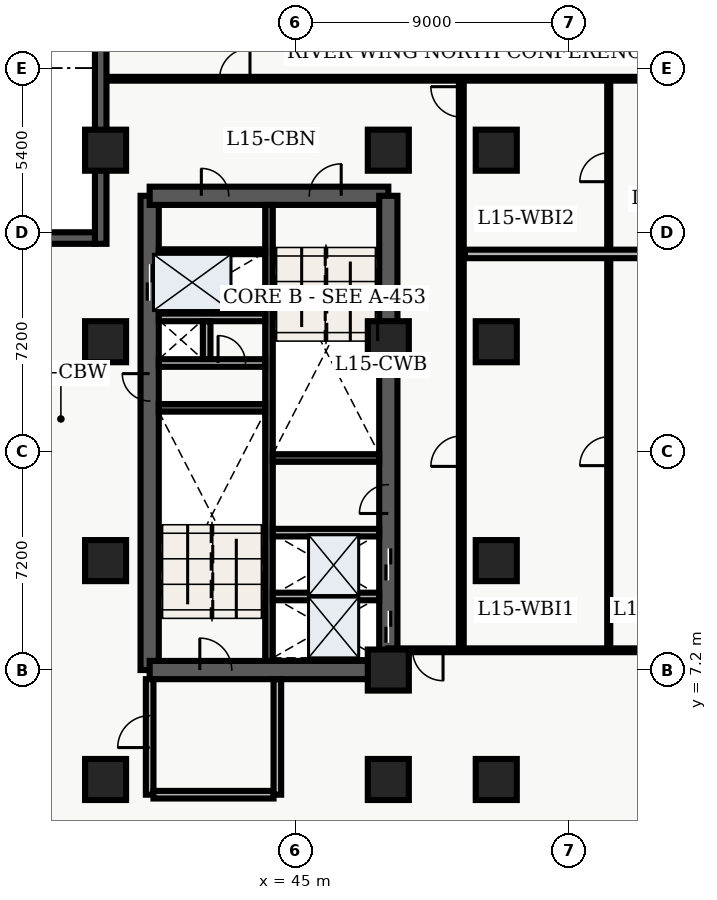
"""IFC4 building model, lengths in metres.
Left out: names, types, materials, properties, quantities, classifications, styles, units other than length and angle.
Written with IfcOpenShell. Run it as: python <this file> out.ifc"""

import sys

from ifc_helpers import new_model, entity, si_unit, converted_unit, direction, frame, origin_with_axes, origin_2d_with_axis, place, context, subcontext, project, spatial, polyline, rectangle, outline, extrude, element, fill, save


model = new_model("IFC4")
c1 = context("Model", 3, precision=1e-05, world=origin_with_axes(), true_north=direction((0.0, 1.0)))
c2 = subcontext(c1, "Body", "Model", "MODEL_VIEW")
j1 = project(units=[si_unit("LENGTHUNIT", "METRE"), converted_unit("PLANEANGLEUNIT", "DEGREE", entity("IfcPlaneAngleMeasure", 0.017), si_unit("PLANEANGLEUNIT", "RADIAN"), dimensions=[0, 0, 0, 0, 0, 0, 0])], contexts=[c1])
p1 = place(None, origin_with_axes())
s1 = spatial("IfcSite", under=j1, at=p1, CompositionType="ELEMENT")
p2 = place(p1, origin_with_axes())
s2 = spatial("IfcBuilding", under=s1, at=p2, CompositionType="ELEMENT")
p3 = place(p2, frame((0.0, 0.0, 63.9), z_axis=(0.0, 0.0, 1.0), x_axis=(1.0, 0.0, 0.0)))
s3 = spatial("IfcBuildingStorey", under=s2, at=p3, CompositionType="ELEMENT", Elevation=63.9)
p4 = place(p3, frame((40.2, 7.2, 0.0), z_axis=(0.0, 0.0, 1.0), x_axis=(0.0, 1.0, 0.0)))
e1 = element("IfcWall", 1, at=p4, inside=s3, PredefinedType="SHEAR", context=c2, shape_type="SweptSolid", body=[
    extrude(outline(polyline([(0.0, -0.3), (15.6, -0.3), (15.6, 0.3), (0.0, 0.3), (0.0, -0.3)])), origin_with_axes(), (0.0, 0.0, 1.0), 3.66),
])
p5 = place(p4, frame((12.75, 0.0, 0.0), z_axis=(0.0, 0.0, 1.0), x_axis=(1.0, 0.0, 0.0)))
e2 = element("IfcOpeningElement", 2, at=p5, cuts=e1, PredefinedType="OPENING", context=c2, shape_type="SweptSolid", body=[
    extrude(rectangle(XDim=1.2, YDim=0.62, at=origin_2d_with_axis()), origin_with_axes(), (0.0, 0.0, 1.0), 2.15),
])
p6 = place(p4, frame((9.3, 0.0, 0.0), z_axis=(0.0, 0.0, 1.0), x_axis=(1.0, 0.0, 0.0)))
e3 = element("IfcOpeningElement", 3, at=p6, cuts=e1, PredefinedType="OPENING", context=c2, shape_type="SweptSolid", body=[
    extrude(rectangle(XDim=0.9, YDim=0.62, at=origin_2d_with_axis()), origin_with_axes(), (0.0, 0.0, 1.0), 2.15),
])
p7 = place(p3, frame((40.2, 7.2, 0.0), z_axis=(0.0, 0.0, 1.0), x_axis=(1.0, 0.0, 0.0)))
e4 = element("IfcWall", 4, at=p7, inside=s3, PredefinedType="SHEAR", context=c2, shape_type="SweptSolid", body=[
    extrude(outline(polyline([(0.0, -0.3), (7.85, -0.3), (7.85, 0.3), (0.0, 0.3), (0.0, -0.3)])), origin_with_axes(), (0.0, 0.0, 1.0), 3.66),
])
p8 = place(p7, frame((2.175, 0.0, 0.0), z_axis=(0.0, 0.0, 1.0), x_axis=(1.0, 0.0, 0.0)))
e5 = element("IfcOpeningElement", 5, at=p8, cuts=e4, PredefinedType="OPENING", context=c2, shape_type="SweptSolid", body=[
    extrude(rectangle(XDim=1.05, YDim=0.62, at=origin_2d_with_axis()), origin_with_axes(), (0.0, 0.0, 1.0), 2.15),
])
p9 = place(p3, frame((40.2, 22.8, 0.0), z_axis=(0.0, 0.0, 1.0), x_axis=(1.0, 0.0, 0.0)))
e6 = element("IfcWall", 6, at=p9, inside=s3, PredefinedType="SHEAR", context=c2, shape_type="SweptSolid", body=[
    extrude(outline(polyline([(0.0, -0.3), (7.85, -0.3), (7.85, 0.3), (0.0, 0.3), (0.0, -0.3)])), origin_with_axes(), (0.0, 0.0, 1.0), 3.66),
])
p10 = place(p9, frame((5.775, 0.0, 0.0), z_axis=(0.0, 0.0, 1.0), x_axis=(1.0, 0.0, 0.0)))
e7 = element("IfcOpeningElement", 7, at=p10, cuts=e6, PredefinedType="OPENING", context=c2, shape_type="SweptSolid", body=[
    extrude(rectangle(XDim=1.05, YDim=0.62, at=origin_2d_with_axis()), origin_with_axes(), (0.0, 0.0, 1.0), 2.15),
])
p11 = place(p9, frame((2.15, 0.0, 0.0), z_axis=(0.0, 0.0, 1.0), x_axis=(1.0, 0.0, 0.0)))
e8 = element("IfcOpeningElement", 8, at=p11, cuts=e6, PredefinedType="OPENING", context=c2, shape_type="SweptSolid", body=[
    extrude(rectangle(XDim=0.9, YDim=0.62, at=origin_2d_with_axis()), origin_with_axes(), (0.0, 0.0, 1.0), 2.15),
])
p12 = place(p3, frame((48.05, 7.2, 0.0), z_axis=(0.0, 0.0, 1.0), x_axis=(0.0, 1.0, 0.0)))
e9 = element("IfcWall", 9, at=p12, inside=s3, PredefinedType="SHEAR", context=c2, shape_type="SweptSolid", body=[
    extrude(outline(polyline([(0.0, -0.3), (15.6, -0.3), (15.6, 0.3), (0.0, 0.3), (0.0, -0.3)])), origin_with_axes(), (0.0, 0.0, 1.0), 3.66),
])
p13 = place(p12, frame((1.425, 0.0, 0.0), z_axis=(0.0, 0.0, 1.0), x_axis=(1.0, 0.0, 0.0)))
e10 = element("IfcOpeningElement", 10, at=p13, cuts=e9, PredefinedType="OPENING", context=c2, shape_type="SweptSolid", body=[
    extrude(rectangle(XDim=1.05, YDim=0.62, at=origin_2d_with_axis()), origin_with_axes(), (0.0, 0.0, 1.0), 2.15),
])
p14 = place(p12, frame((3.475, 0.0, 0.0), z_axis=(0.0, 0.0, 1.0), x_axis=(1.0, 0.0, 0.0)))
e11 = element("IfcOpeningElement", 11, at=p14, cuts=e9, PredefinedType="OPENING", context=c2, shape_type="SweptSolid", body=[
    extrude(rectangle(XDim=1.05, YDim=0.62, at=origin_2d_with_axis()), origin_with_axes(), (0.0, 0.0, 1.0), 2.15),
])
p15 = place(p12, frame((5.625, 0.0, 0.0), z_axis=(0.0, 0.0, 1.0), x_axis=(1.0, 0.0, 0.0)))
e12 = element("IfcOpeningElement", 12, at=p15, cuts=e9, PredefinedType="OPENING", context=c2, shape_type="SweptSolid", body=[
    extrude(rectangle(XDim=0.95, YDim=0.62, at=origin_2d_with_axis()), origin_with_axes(), (0.0, 0.0, 1.0), 2.15),
])
p16 = place(p3, frame((44.125, 7.5, 0.0), z_axis=(0.0, 0.0, 1.0), x_axis=(0.0, 1.0, 0.0)))
e13 = element("IfcWall", 13, at=p16, inside=s3, PredefinedType="SHEAR", context=c2, shape_type="SweptSolid", body=[
    extrude(outline(polyline([(0.0, -0.125), (15.0, -0.125), (15.0, 0.125), (0.0, 0.125), (0.0, -0.125)])), origin_with_axes(), (0.0, 0.0, 1.0), 3.66),
])
for number, where, z_axis, x_axis in (
    (14, (40.5, 15.825, 0.0), (0.0, 0.0, 1.0), (1.0, 0.0, 0.0)),
    (15, (44.25, 14.175, 0.0), (0.0, 0.0, 1.0), (1.0, 0.0, 0.0)),
):
    element("IfcWall", number, at=place(p3, frame(where, z_axis=z_axis, x_axis=x_axis)), inside=s3, PredefinedType="SHEAR", context=c2, shape_type="SweptSolid", body=[
        extrude(outline(polyline([(0.0, -0.125), (3.5, -0.125), (3.5, 0.125), (0.0, 0.125), (0.0, -0.125)])), origin_with_axes(), (0.0, 0.0, 1.0), 3.66),
    ])
p17 = place(p3, frame((40.5, 17.3, 0.0), z_axis=(0.0, 0.0, 1.0), x_axis=(1.0, 0.0, 0.0)))
e16 = element("IfcWall", 16, at=p17, inside=s3, PredefinedType="SOLIDWALL", context=c2, shape_type="SweptSolid", body=[
    extrude(outline(polyline([(0.0, -0.125), (3.5, -0.125), (3.5, 0.125), (0.0, 0.125), (0.0, -0.125)])), origin_with_axes(), (0.0, 0.0, 1.0), 2.7),
])
p18 = place(p17, frame((2.4, 0.0, 0.0), z_axis=(0.0, 0.0, 1.0), x_axis=(1.0, 0.0, 0.0)))
e17 = element("IfcOpeningElement", 17, at=p18, cuts=e16, PredefinedType="OPENING", context=c2, shape_type="SweptSolid", body=[
    extrude(rectangle(XDim=0.9, YDim=0.27, at=origin_2d_with_axis()), origin_with_axes(), (0.0, 0.0, 1.0), 2.15),
])
p19 = place(p3, frame((40.5, 18.8, 0.0), z_axis=(0.0, 0.0, 1.0), x_axis=(1.0, 0.0, 0.0)))
e18 = element("IfcWall", 18, at=p19, inside=s3, PredefinedType="SOLIDWALL", context=c2, shape_type="SweptSolid", body=[
    extrude(outline(polyline([(0.0, -0.125), (3.5, -0.125), (3.5, 0.125), (0.0, 0.125), (0.0, -0.125)])), origin_with_axes(), (0.0, 0.0, 1.0), 2.7),
])
p20 = place(p3, frame((42.075, 17.43, 0.0), z_axis=(0.0, 0.0, 1.0), x_axis=(0.0, 1.0, 0.0)))
e19 = element("IfcWall", 19, at=p20, inside=s3, PredefinedType="SOLIDWALL", context=c2, shape_type="SweptSolid", body=[
    extrude(outline(polyline([(0.0, -0.125), (1.24, -0.125), (1.24, 0.125), (0.0, 0.125), (0.0, -0.125)])), origin_with_axes(), (0.0, 0.0, 1.0), 2.7),
])
p21 = place(p3, frame((40.2, 3.1, 0.0), z_axis=(0.0, 0.0, 1.0), x_axis=(0.0, 1.0, 0.0)))
e20 = element("IfcWall", 20, at=p21, inside=s3, PredefinedType="SOLIDWALL", context=c2, shape_type="SweptSolid", body=[
    extrude(outline(polyline([(0.0, -0.125), (3.8, -0.125), (3.8, 0.125), (0.0, 0.125), (0.0, -0.125)])), origin_with_axes(), (0.0, 0.0, 1.0), 2.7),
])
p22 = place(p21, frame((2.075, 0.0, 0.0), z_axis=(0.0, 0.0, 1.0), x_axis=(1.0, 0.0, 0.0)))
e21 = element("IfcOpeningElement", 21, at=p22, cuts=e20, PredefinedType="OPENING", context=c2, shape_type="SweptSolid", body=[
    extrude(rectangle(XDim=1.05, YDim=0.27, at=origin_2d_with_axis()), origin_with_axes(), (0.0, 0.0, 1.0), 2.15),
])
p23 = place(p3, frame((40.325, 3.1, 0.0), z_axis=(0.0, 0.0, 1.0), x_axis=(1.0, 0.0, 0.0)))
e22 = element("IfcWall", 22, at=p23, inside=s3, PredefinedType="SOLIDWALL", context=c2, shape_type="SweptSolid", body=[
    extrude(outline(polyline([(0.0, -0.125), (3.95, -0.125), (3.95, 0.125), (0.0, 0.125), (0.0, -0.125)])), origin_with_axes(), (0.0, 0.0, 1.0), 2.7),
])
p24 = place(p3, frame((44.4, 3.1, 0.0), z_axis=(0.0, 0.0, 1.0), x_axis=(0.0, 1.0, 0.0)))
e23 = element("IfcWall", 23, at=p24, inside=s3, PredefinedType="SOLIDWALL", context=c2, shape_type="SweptSolid", body=[
    extrude(outline(polyline([(0.0, -0.125), (3.8, -0.125), (3.8, 0.125), (0.0, 0.125), (0.0, -0.125)])), origin_with_axes(), (0.0, 0.0, 1.0), 2.7),
])
for number, where, z_axis, x_axis in (
    (24, (38.75, 3.6, 0.0), (0.0, 0.0, 1.0), (1.0, 0.0, 0.0)),
    (25, (38.75, 10.8, 0.0), (0.0, 0.0, 1.0), (1.0, 0.0, 0.0)),
    (26, (38.75, 18.0, 0.0), (0.0, 0.0, 1.0), (1.0, 0.0, 0.0)),
    (27, (38.75, 24.3, 0.0), (0.0, 0.0, 1.0), (1.0, 0.0, 0.0)),
    (28, (48.05, 3.6, 0.0), (0.0, 0.0, 1.0), (1.0, 0.0, 0.0)),
    (29, (48.05, 7.2, 0.0), (0.0, 0.0, 1.0), (1.0, 0.0, 0.0)),
    (30, (48.05, 18.0, 0.0), (0.0, 0.0, 1.0), (1.0, 0.0, 0.0)),
    (31, (48.05, 24.3, 0.0), (0.0, 0.0, 1.0), (1.0, 0.0, 0.0)),
    (32, (51.6, 3.6, 0.0), (0.0, 0.0, 1.0), (1.0, 0.0, 0.0)),
    (33, (51.6, 10.8, 0.0), (0.0, 0.0, 1.0), (1.0, 0.0, 0.0)),
    (34, (51.6, 18.0, 0.0), (0.0, 0.0, 1.0), (1.0, 0.0, 0.0)),
    (35, (51.6, 24.3, 0.0), (0.0, 0.0, 1.0), (1.0, 0.0, 0.0)),
):
    element("IfcColumn", number, at=place(p3, frame(where, z_axis=z_axis, x_axis=x_axis)), inside=s3, PredefinedType="COLUMN", context=c2, shape_type="SweptSolid", body=[
        extrude(rectangle(XDim=1.35, YDim=1.35, at=origin_2d_with_axis()), origin_with_axes(), (0.0, 0.0, 1.0), 3.9),
    ])
p25 = place(p3, frame((40.5, 20.96, 0.0), z_axis=(0.0, 0.0, 1.0), x_axis=(1.0, 0.0, 0.0)))
e36 = element("IfcWall", 36, at=p25, inside=s3, PredefinedType="PARTITIONING", context=c2, shape_type="SweptSolid", body=[
    extrude(outline(polyline([(0.0, -0.08), (3.5, -0.08), (3.5, 0.08), (0.0, 0.08), (0.0, -0.08)])), origin_with_axes(), (0.0, 0.0, 1.0), 2.7),
])
for number, where, z_axis, x_axis in (
    (37, (44.25, 9.62, 0.0), (0.0, 0.0, 1.0), (1.0, 0.0, 0.0)),
    (38, (44.25, 11.72, 0.0), (0.0, 0.0, 1.0), (1.0, 0.0, 0.0)),
):
    element("IfcWall", number, at=place(p3, frame(where, z_axis=z_axis, x_axis=x_axis)), inside=s3, PredefinedType="SOLIDWALL", context=c2, shape_type="SweptSolid", body=[
        extrude(outline(polyline([(0.0, -0.125), (3.5, -0.125), (3.5, 0.125), (0.0, 0.125), (0.0, -0.125)])), origin_with_axes(), (0.0, 0.0, 1.0), 2.7),
    ])
p26 = place(p3, frame((50.45, 7.85, 0.0), z_axis=(0.0, 0.0, 1.0), x_axis=(0.0, 1.0, 0.0)))
e39 = element("IfcWall", 39, at=p26, inside=s3, PredefinedType="PARTITIONING", context=c2, shape_type="SweptSolid", body=[
    extrude(outline(polyline([(0.0, -0.08), (18.8, -0.08), (18.8, 0.08), (0.0, 0.08), (0.0, -0.08)])), origin_with_axes(), (0.0, 0.0, 1.0), 2.7),
])
p27 = place(p26, frame((6.549, 0.0, 0.0), z_axis=(0.0, 0.0, 1.0), x_axis=(1.0, 0.0, 0.0)))
e40 = element("IfcOpeningElement", 40, at=p27, cuts=e39, PredefinedType="OPENING", context=c2, shape_type="SweptSolid", body=[
    extrude(rectangle(XDim=1.0, YDim=0.18, at=origin_2d_with_axis()), origin_with_axes(), (0.0, 0.0, 1.0), 2.15),
])
p28 = place(p26, frame((18.039, 0.0, 0.0), z_axis=(0.0, 0.0, 1.0), x_axis=(1.0, 0.0, 0.0)))
e41 = element("IfcOpeningElement", 41, at=p28, cuts=e39, PredefinedType="OPENING", context=c2, shape_type="SweptSolid", body=[
    extrude(rectangle(XDim=1.0, YDim=0.18, at=origin_2d_with_axis()), origin_with_axes(), (0.0, 0.0, 1.0), 2.15),
])
p29 = place(p3, frame((59.64, 7.85, 0.0), z_axis=(0.0, 0.0, 1.0), x_axis=(-1.0, 0.0, 0.0)))
e42 = element("IfcWall", 42, at=p29, inside=s3, PredefinedType="PARTITIONING", context=c2, shape_type="SweptSolid", body=[
    extrude(outline(polyline([(0.0, -0.062), (11.59, -0.062), (11.59, 0.062), (0.0, 0.062), (0.0, -0.062)])), origin_with_axes(), (0.0, 0.0, 1.0), 2.7),
])
p30 = place(p29, frame((10.29, 0.0, 0.0), z_axis=(0.0, 0.0, 1.0), x_axis=(1.0, 0.0, 0.0)))
e43 = element("IfcOpeningElement", 43, at=p30, cuts=e42, PredefinedType="OPENING", context=c2, shape_type="SweptSolid", body=[
    extrude(rectangle(XDim=1.0, YDim=0.145, at=origin_2d_with_axis()), origin_with_axes(), (0.0, 0.0, 1.0), 2.15),
])
p31 = place(p3, frame((38.76, 26.65, 0.0), z_axis=(0.0, 0.0, 1.0), x_axis=(1.0, 0.0, 0.0)))
e44 = element("IfcWall", 44, at=p31, inside=s3, PredefinedType="PARTITIONING", context=c2, shape_type="SweptSolid", body=[
    extrude(outline(polyline([(0.0, -0.062), (20.88, -0.062), (20.88, 0.062), (0.0, 0.062), (0.0, -0.062)])), origin_with_axes(), (0.0, 0.0, 1.0), 2.7),
])
p32 = place(p31, frame((4.24, 0.0, 0.0), z_axis=(0.0, 0.0, 1.0), x_axis=(1.0, 0.0, 0.0)))
e45 = element("IfcOpeningElement", 45, at=p32, cuts=e44, PredefinedType="OPENING", context=c2, shape_type="SweptSolid", body=[
    extrude(rectangle(XDim=1.0, YDim=0.145, at=origin_2d_with_axis()), origin_with_axes(), (0.0, 0.0, 1.0), 2.15),
])
p33 = place(p3, frame((55.3, 7.98, 0.0), z_axis=(0.0, 0.0, 1.0), x_axis=(0.0, 1.0, 0.0)))
e46 = element("IfcWall", 46, at=p33, inside=s3, PredefinedType="PARTITIONING", context=c2, shape_type="SweptSolid", body=[
    extrude(outline(polyline([(0.0, -0.05), (18.54, -0.05), (18.54, 0.05), (0.0, 0.05), (0.0, -0.05)])), origin_with_axes(), (0.0, 0.0, 1.0), 2.7),
])
p34 = place(p33, frame((6.419, 0.0, 0.0), z_axis=(0.0, 0.0, 1.0), x_axis=(1.0, 0.0, 0.0)))
e47 = element("IfcOpeningElement", 47, at=p34, cuts=e46, PredefinedType="OPENING", context=c2, shape_type="SweptSolid", body=[
    extrude(rectangle(XDim=0.95, YDim=0.12, at=origin_2d_with_axis()), origin_with_axes(), (0.0, 0.0, 1.0), 2.15),
])
p35 = place(p33, frame((15.759, 0.0, 0.0), z_axis=(0.0, 0.0, 1.0), x_axis=(1.0, 0.0, 0.0)))
e48 = element("IfcOpeningElement", 48, at=p35, cuts=e46, PredefinedType="OPENING", context=c2, shape_type="SweptSolid", body=[
    extrude(rectangle(XDim=0.95, YDim=0.12, at=origin_2d_with_axis()), origin_with_axes(), (0.0, 0.0, 1.0), 2.15),
])
p36 = place(p3, frame((50.57, 20.888, 0.0), z_axis=(0.0, 0.0, 1.0), x_axis=(1.0, 0.0, 0.0)))
e49 = element("IfcWall", 49, at=p36, inside=s3, PredefinedType="PARTITIONING", context=c2, shape_type="SweptSolid", body=[
    extrude(outline(polyline([(0.0, -0.14), (9.055, -0.14), (9.055, 0.14), (0.0, 0.14), (0.0, -0.14)])), origin_with_axes(), (0.0, 0.0, 1.0), 2.7),
])
p37 = place(p3, frame((38.59, 21.22, 0.0), z_axis=(0.0, 0.0, 1.0), x_axis=(0.0, 1.0, 0.0)))
e50 = element("IfcWall", 50, at=p37, inside=s3, PredefinedType="SOLIDWALL", context=c2, shape_type="SweptSolid", body=[
    extrude(outline(polyline([(0.0, -0.19), (7.58, -0.19), (7.58, 0.19), (0.0, 0.19), (0.0, -0.19)])), origin_with_axes(), (0.0, 0.0, 1.0), 3.66),
])
p38 = place(p3, frame((21.22, 21.41, 0.0), z_axis=(0.0, 0.0, 1.0), x_axis=(1.0, 0.0, 0.0)))
e51 = element("IfcWall", 51, at=p38, inside=s3, PredefinedType="SOLIDWALL", context=c2, shape_type="SweptSolid", body=[
    extrude(outline(polyline([(0.0, -0.19), (17.18, -0.19), (17.18, 0.19), (0.0, 0.19), (0.0, -0.19)])), origin_with_axes(), (0.0, 0.0, 1.0), 3.66),
])
p39 = place(p38, frame((8.59, 0.0, 0.45), z_axis=(0.0, 0.0, 1.0), x_axis=(1.0, 0.0, 0.0)))
e52 = element("IfcOpeningElement", 52, at=p39, cuts=e51, PredefinedType="OPENING", context=c2, shape_type="SweptSolid", body=[
    extrude(rectangle(XDim=2.1, YDim=0.4, at=origin_2d_with_axis()), origin_with_axes(), (0.0, 0.0, 1.0), 2.2),
])
p40 = place(p38, frame((13.467, 0.0, 0.45), z_axis=(0.0, 0.0, 1.0), x_axis=(1.0, 0.0, 0.0)))
e53 = element("IfcOpeningElement", 53, at=p40, cuts=e51, PredefinedType="OPENING", context=c2, shape_type="SweptSolid", body=[
    extrude(rectangle(XDim=2.1, YDim=0.4, at=origin_2d_with_axis()), origin_with_axes(), (0.0, 0.0, 1.0), 2.2),
])
p41 = place(p12, frame((1.425, 0.0, 0.0), z_axis=(0.0, 0.0, 1.0), x_axis=(1.0, 0.0, 0.0)))
e54 = element("IfcDoor", 54, at=p41, inside=s3, OperationType="SLIDING_TO_LEFT", PredefinedType="DOOR", context=c2, shape_type="SweptSolid", body=[
    extrude(rectangle(XDim=1.05, YDim=0.09, at=origin_2d_with_axis()), origin_with_axes(), (0.0, 0.0, 1.0), 2.15),
])
fill(e10, e54)
p42 = place(p12, frame((3.475, 0.0, 0.0), z_axis=(0.0, 0.0, 1.0), x_axis=(1.0, 0.0, 0.0)))
e55 = element("IfcDoor", 55, at=p42, inside=s3, OperationType="SLIDING_TO_RIGHT", PredefinedType="DOOR", context=c2, shape_type="SweptSolid", body=[
    extrude(rectangle(XDim=1.05, YDim=0.09, at=origin_2d_with_axis()), origin_with_axes(), (0.0, 0.0, 1.0), 2.15),
])
fill(e11, e55)
p43 = place(p4, frame((12.75, 0.0, 0.0), z_axis=(0.0, 0.0, 1.0), x_axis=(1.0, 0.0, 0.0)))
e56 = element("IfcDoor", 56, at=p43, inside=s3, OperationType="DOUBLE_DOOR_SLIDING", PredefinedType="DOOR", context=c2, shape_type="SweptSolid", body=[
    extrude(rectangle(XDim=1.2, YDim=0.09, at=origin_2d_with_axis()), origin_with_axes(), (0.0, 0.0, 1.0), 2.15),
])
fill(e2, e56)
p44 = place(p4, frame((9.3, 0.0, 0.0), z_axis=(0.0, 0.0, 1.0), x_axis=(1.0, 0.0, 0.0)))
e57 = element("IfcDoor", 57, at=p44, inside=s3, OperationType="SINGLE_SWING_RIGHT", PredefinedType="DOOR", context=c2, shape_type="SweptSolid", body=[
    extrude(rectangle(XDim=0.9, YDim=0.09, at=origin_2d_with_axis()), origin_with_axes(), (0.0, 0.0, 1.0), 2.15),
])
fill(e3, e57)
p45 = place(p17, frame((2.4, 0.0, 0.0), z_axis=(0.0, 0.0, 1.0), x_axis=(1.0, 0.0, 0.0)))
e58 = element("IfcDoor", 58, at=p45, inside=s3, OperationType="SINGLE_SWING_LEFT", PredefinedType="DOOR", context=c2, shape_type="SweptSolid", body=[
    extrude(rectangle(XDim=0.9, YDim=0.09, at=origin_2d_with_axis()), origin_with_axes(), (0.0, 0.0, 1.0), 2.15),
])
fill(e17, e58)
p46 = place(p7, frame((2.175, 0.0, 0.0), z_axis=(0.0, 0.0, 1.0), x_axis=(1.0, 0.0, 0.0)))
e59 = element("IfcDoor", 59, at=p46, inside=s3, OperationType="SINGLE_SWING_LEFT", PredefinedType="DOOR", context=c2, shape_type="SweptSolid", body=[
    extrude(rectangle(XDim=1.05, YDim=0.09, at=origin_2d_with_axis()), origin_with_axes(), (0.0, 0.0, 1.0), 2.15),
])
fill(e5, e59)
p47 = place(p9, frame((5.775, 0.0, 0.0), z_axis=(0.0, 0.0, 1.0), x_axis=(1.0, 0.0, 0.0)))
e60 = element("IfcDoor", 60, at=p47, inside=s3, OperationType="SINGLE_SWING_RIGHT", PredefinedType="DOOR", context=c2, shape_type="SweptSolid", body=[
    extrude(rectangle(XDim=1.05, YDim=0.09, at=origin_2d_with_axis()), origin_with_axes(), (0.0, 0.0, 1.0), 2.15),
])
fill(e7, e60)
p48 = place(p21, frame((2.075, 0.0, 0.0), z_axis=(0.0, 0.0, 1.0), x_axis=(1.0, 0.0, 0.0)))
e61 = element("IfcDoor", 61, at=p48, inside=s3, OperationType="SINGLE_SWING_LEFT", PredefinedType="DOOR", context=c2, shape_type="SweptSolid", body=[
    extrude(rectangle(XDim=1.05, YDim=0.09, at=origin_2d_with_axis()), origin_with_axes(), (0.0, 0.0, 1.0), 2.15),
])
fill(e21, e61)
p49 = place(p9, frame((2.15, 0.0, 0.0), z_axis=(0.0, 0.0, 1.0), x_axis=(1.0, 0.0, 0.0)))
e62 = element("IfcDoor", 62, at=p49, inside=s3, OperationType="SINGLE_SWING_LEFT", PredefinedType="DOOR", context=c2, shape_type="SweptSolid", body=[
    extrude(rectangle(XDim=0.9, YDim=0.09, at=origin_2d_with_axis()), origin_with_axes(), (0.0, 0.0, 1.0), 2.15),
])
fill(e8, e62)
p50 = place(p12, frame((5.625, 0.0, 0.0), z_axis=(0.0, 0.0, 1.0), x_axis=(1.0, 0.0, 0.0)))
e63 = element("IfcDoor", 63, at=p50, inside=s3, OperationType="SINGLE_SWING_LEFT", PredefinedType="DOOR", context=c2, shape_type="SweptSolid", body=[
    extrude(rectangle(XDim=0.95, YDim=0.09, at=origin_2d_with_axis()), origin_with_axes(), (0.0, 0.0, 1.0), 2.15),
])
fill(e12, e63)
p51 = place(p29, frame((10.29, 0.0, 0.0), z_axis=(0.0, 0.0, 1.0), x_axis=(1.0, 0.0, 0.0)))
e64 = element("IfcDoor", 64, at=p51, inside=s3, OperationType="SINGLE_SWING_LEFT", PredefinedType="DOOR", context=c2, shape_type="SweptSolid", body=[
    extrude(rectangle(XDim=1.0, YDim=0.075, at=origin_2d_with_axis()), origin_with_axes(), (0.0, 0.0, 1.0), 2.15),
])
fill(e43, e64)
p52 = place(p31, frame((4.24, 0.0, 0.0), z_axis=(0.0, 0.0, 1.0), x_axis=(1.0, 0.0, 0.0)))
e65 = element("IfcDoor", 65, at=p52, inside=s3, OperationType="SINGLE_SWING_RIGHT", PredefinedType="DOOR", context=c2, shape_type="SweptSolid", body=[
    extrude(rectangle(XDim=1.0, YDim=0.075, at=origin_2d_with_axis()), origin_with_axes(), (0.0, 0.0, 1.0), 2.15),
])
fill(e45, e65)
p53 = place(p33, frame((6.419, 0.0, 0.0), z_axis=(0.0, 0.0, 1.0), x_axis=(1.0, 0.0, 0.0)))
e66 = element("IfcDoor", 66, at=p53, inside=s3, OperationType="SINGLE_SWING_LEFT", PredefinedType="DOOR", context=c2, shape_type="SweptSolid", body=[
    extrude(rectangle(XDim=0.95, YDim=0.06, at=origin_2d_with_axis()), origin_with_axes(), (0.0, 0.0, 1.0), 2.15),
])
fill(e47, e66)
p54 = place(p26, frame((6.549, 0.0, 0.0), z_axis=(0.0, 0.0, 1.0), x_axis=(1.0, 0.0, 0.0)))
e67 = element("IfcDoor", 67, at=p54, inside=s3, OperationType="SINGLE_SWING_LEFT", PredefinedType="DOOR", context=c2, shape_type="SweptSolid", body=[
    extrude(rectangle(XDim=1.0, YDim=0.09, at=origin_2d_with_axis()), origin_with_axes(), (0.0, 0.0, 1.0), 2.15),
])
fill(e40, e67)
p55 = place(p33, frame((15.759, 0.0, 0.0), z_axis=(0.0, 0.0, 1.0), x_axis=(1.0, 0.0, 0.0)))
e68 = element("IfcDoor", 68, at=p55, inside=s3, OperationType="SINGLE_SWING_LEFT", PredefinedType="DOOR", context=c2, shape_type="SweptSolid", body=[
    extrude(rectangle(XDim=0.95, YDim=0.06, at=origin_2d_with_axis()), origin_with_axes(), (0.0, 0.0, 1.0), 2.15),
])
fill(e48, e68)
p56 = place(p26, frame((18.039, 0.0, 0.0), z_axis=(0.0, 0.0, 1.0), x_axis=(1.0, 0.0, 0.0)))
e69 = element("IfcDoor", 69, at=p56, inside=s3, OperationType="SINGLE_SWING_RIGHT", PredefinedType="DOOR", context=c2, shape_type="SweptSolid", body=[
    extrude(rectangle(XDim=1.0, YDim=0.09, at=origin_2d_with_axis()), origin_with_axes(), (0.0, 0.0, 1.0), 2.15),
])
fill(e41, e69)
save(model, sys.argv[1])
